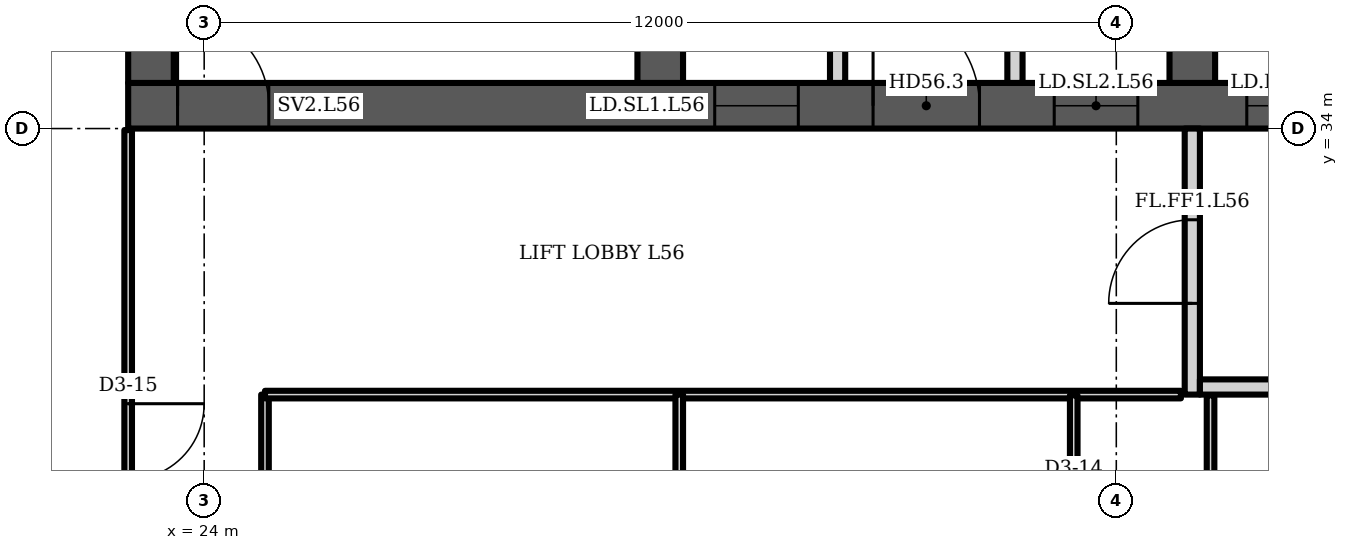
"""IFC4 building model, lengths in metres.
Left out: names, types, materials, properties, quantities, classifications, styles, units other than length and angle.
Written with IfcOpenShell. Run it as: python <this file> out.ifc"""

import sys

from ifc_helpers import new_model, si_unit, direction, frame, frame_2d, origin, place, context, subcontext, project, spatial, polyline, rectangle, outline, extrude, element, fill, save


model = new_model("IFC4")
c1 = context("Model", 3, precision=1e-05, world=origin(), true_north=direction((0.0, 1.0)))
c2 = subcontext(c1, "Body", "Model", "MODEL_VIEW")
j1 = project(units=[si_unit("LENGTHUNIT", "METRE"), si_unit("PLANEANGLEUNIT", "RADIAN")], contexts=[c1])
p1 = place(None, origin())
s1 = spatial("IfcSite", under=j1, at=p1, CompositionType="ELEMENT")
p2 = place(p1, origin())
s2 = spatial("IfcBuilding", under=s1, at=p2, CompositionType="ELEMENT")
p3 = place(p2, frame((0.0, 0.0, 225.1)))
s3 = spatial("IfcBuildingStorey", under=s2, at=p3, CompositionType="ELEMENT", Elevation=225.1)
p4 = place(p3, frame((23.0, 34.3, 0.0), z_axis=(0.0, 0.0, 1.0), x_axis=(1.0, 0.0, 0.0)))
e1 = element("IfcWall", 1, at=p4, inside=s3, PredefinedType="SHEAR", context=c2, shape_type="SweptSolid", body=[
    extrude(rectangle(XDim=35.0, YDim=0.6, at=frame_2d((17.5, 0.0))), origin(), (0.0, 0.0, 1.0), 3.6),
])
p5 = place(p4, frame((0.65, 0.0, 0.0)))
e2 = element("IfcOpeningElement", 2, at=p5, cuts=e1, PredefinedType="OPENING", context=c2, shape_type="SweptSolid", body=[
    extrude(rectangle(XDim=1.2, YDim=2.1, at=frame_2d((0.6, 1.05))), frame((0.0, 0.31, 0.0), z_axis=(0.0, -1.0, 0.0), x_axis=(1.0, 0.0, 0.0)), (0.0, 0.0, 1.0), 0.62),
])
p6 = place(p4, frame((7.717, 0.0, 0.0)))
e3 = element("IfcOpeningElement", 3, at=p6, cuts=e1, PredefinedType="OPENING", context=c2, shape_type="SweptSolid", body=[
    extrude(rectangle(XDim=1.1, YDim=2.1, at=frame_2d((0.55, 1.05))), frame((0.0, 0.31, 0.0), z_axis=(0.0, -1.0, 0.0), x_axis=(1.0, 0.0, 0.0)), (0.0, 0.0, 1.0), 0.62),
])
p7 = place(p4, frame((12.183, 0.0, 0.0)))
e4 = element("IfcOpeningElement", 4, at=p7, cuts=e1, PredefinedType="OPENING", context=c2, shape_type="SweptSolid", body=[
    extrude(rectangle(XDim=1.1, YDim=2.1, at=frame_2d((0.55, 1.05))), frame((0.0, 0.31, 0.0), z_axis=(0.0, -1.0, 0.0), x_axis=(1.0, 0.0, 0.0)), (0.0, 0.0, 1.0), 0.62),
])
p8 = place(p4, frame((9.8, 0.0, 0.0)))
e5 = element("IfcOpeningElement", 5, at=p8, cuts=e1, PredefinedType="OPENING", context=c2, shape_type="SweptSolid", body=[
    extrude(rectangle(XDim=1.4, YDim=2.1, at=frame_2d((0.7, 1.05))), frame((0.0, 0.31, 0.0), z_axis=(0.0, -1.0, 0.0), x_axis=(1.0, 0.0, 0.0)), (0.0, 0.0, 1.0), 0.62),
])
p9 = place(p4, frame((14.717, 0.0, 0.0)))
e6 = element("IfcOpeningElement", 6, at=p9, cuts=e1, PredefinedType="OPENING", context=c2, shape_type="SweptSolid", body=[
    extrude(rectangle(XDim=1.1, YDim=2.1, at=frame_2d((0.55, 1.05))), frame((0.0, 0.31, 0.0), z_axis=(0.0, -1.0, 0.0), x_axis=(1.0, 0.0, 0.0)), (0.0, 0.0, 1.0), 0.62),
])
p10 = place(p4, frame((16.95, 0.0, 0.0)))
e7 = element("IfcOpeningElement", 7, at=p10, cuts=e1, PredefinedType="OPENING", context=c2, shape_type="SweptSolid", body=[
    extrude(rectangle(XDim=1.1, YDim=2.1, at=frame_2d((0.55, 1.05))), frame((0.0, 0.31, 0.0), z_axis=(0.0, -1.0, 0.0), x_axis=(1.0, 0.0, 0.0)), (0.0, 0.0, 1.0), 0.62),
])
p11 = place(p4, frame((19.183, 0.0, 0.0)))
e8 = element("IfcOpeningElement", 8, at=p11, cuts=e1, PredefinedType="OPENING", context=c2, shape_type="SweptSolid", body=[
    extrude(rectangle(XDim=1.1, YDim=2.1, at=frame_2d((0.55, 1.05))), frame((0.0, 0.31, 0.0), z_axis=(0.0, -1.0, 0.0), x_axis=(1.0, 0.0, 0.0)), (0.0, 0.0, 1.0), 0.62),
])
p12 = place(p4, frame((26.15, 0.0, 0.0)))
e9 = element("IfcOpeningElement", 9, at=p12, cuts=e1, PredefinedType="OPENING", context=c2, shape_type="SweptSolid", body=[
    extrude(rectangle(XDim=1.2, YDim=2.1, at=frame_2d((0.6, 1.05))), frame((0.0, 0.31, 0.0), z_axis=(0.0, -1.0, 0.0), x_axis=(1.0, 0.0, 0.0)), (0.0, 0.0, 1.0), 0.62),
])
p13 = place(p4, frame((30.8, 0.0, 0.0)))
e10 = element("IfcOpeningElement", 10, at=p13, cuts=e1, PredefinedType="OPENING", context=c2, shape_type="SweptSolid", body=[
    extrude(rectangle(XDim=1.4, YDim=2.1, at=frame_2d((0.7, 1.05))), frame((0.0, 0.31, 0.0), z_axis=(0.0, -1.0, 0.0), x_axis=(1.0, 0.0, 0.0)), (0.0, 0.0, 1.0), 0.62),
])
p14 = place(p3, frame((23.3, 34.6, 0.0), z_axis=(0.0, 0.0, 1.0), x_axis=(0.0, 1.0, 0.0)))
e11 = element("IfcWall", 11, at=p14, inside=s3, PredefinedType="SHEAR", context=c2, shape_type="SweptSolid", body=[
    extrude(rectangle(XDim=13.585, YDim=0.6, at=frame_2d((6.792, 0.0))), origin(), (0.0, 0.0, 1.0), 3.6),
])
p15 = place(p3, frame((30.0, 34.6, 0.0), z_axis=(0.0, 0.0, 1.0), x_axis=(0.0, 1.0, 0.0)))
e12 = element("IfcWall", 12, at=p15, inside=s3, PredefinedType="SHEAR", context=c2, shape_type="SweptSolid", body=[
    extrude(rectangle(XDim=14.171, YDim=0.6, at=frame_2d((7.085, 0.0))), origin(), (0.0, 0.0, 1.0), 3.6),
])
p16 = place(p15, frame((3.8, 0.0, 0.0)))
e13 = element("IfcOpeningElement", 13, at=p16, cuts=e12, PredefinedType="OPENING", context=c2, shape_type="SweptSolid", body=[
    extrude(rectangle(XDim=1.1, YDim=2.1, at=frame_2d((0.55, 1.05))), frame((0.0, 0.31, 0.0), z_axis=(0.0, -1.0, 0.0), x_axis=(1.0, 0.0, 0.0)), (0.0, 0.0, 1.0), 0.62),
])
p17 = place(p3, frame((37.0, 34.6, 0.0), z_axis=(0.0, 0.0, 1.0), x_axis=(0.0, 1.0, 0.0)))
e14 = element("IfcWall", 14, at=p17, inside=s3, PredefinedType="SHEAR", context=c2, shape_type="SweptSolid", body=[
    extrude(rectangle(XDim=14.784, YDim=0.6, at=frame_2d((7.392, 0.0))), origin(), (0.0, 0.0, 1.0), 3.6),
])
p18 = place(p17, frame((11.302, 0.0, 0.0)))
e15 = element("IfcOpeningElement", 15, at=p18, cuts=e14, PredefinedType="OPENING", context=c2, shape_type="SweptSolid", body=[
    extrude(rectangle(XDim=1.0, YDim=2.1, at=frame_2d((0.5, 1.05))), frame((0.0, 0.31, 0.0), z_axis=(0.0, -1.0, 0.0), x_axis=(1.0, 0.0, 0.0)), (0.0, 0.0, 1.0), 0.62),
])
p19 = place(p17, frame((3.8, 0.0, 0.0)))
e16 = element("IfcOpeningElement", 16, at=p19, cuts=e14, PredefinedType="OPENING", context=c2, shape_type="SweptSolid", body=[
    extrude(rectangle(XDim=1.1, YDim=2.1, at=frame_2d((0.55, 1.05))), frame((0.0, 0.31, 0.0), z_axis=(0.0, -1.0, 0.0), x_axis=(1.0, 0.0, 0.0)), (0.0, 0.0, 1.0), 0.62),
])
p20 = place(p3, frame((0.0, 0.0, -0.0)))
e17 = element("IfcWall", 17, at=p20, inside=s3, PredefinedType="PARTITIONING", context=c2, shape_type="SweptSolid", body=[
    extrude(outline(polyline([(32.233, 37.45), (30.3, 37.45), (30.3, 37.65), (32.233, 37.65), (32.433, 37.65), (32.433, 34.6), (32.233, 34.6), (32.233, 37.45)])), origin(), (0.0, 0.0, 1.0), 3.2),
])
p21 = place(p3, frame((0.0, 0.0, -0.0)))
e18 = element("IfcWall", 18, at=p21, inside=s3, PredefinedType="PARTITIONING", context=c2, shape_type="SweptSolid", body=[
    extrude(outline(polyline([(34.567, 37.65), (34.767, 37.65), (36.7, 37.65), (36.7, 37.45), (34.767, 37.45), (34.767, 34.6), (34.567, 34.6), (34.567, 37.65)])), origin(), (0.0, 0.0, 1.0), 3.2),
])
p22 = place(p3, frame((0.0, 0.0, -0.0)))
e19 = element("IfcWall", 19, at=p22, inside=s3, PredefinedType="PARTITIONING", context=c2, shape_type="SweptSolid", body=[
    extrude(outline(polyline([(41.567, 37.1), (39.433, 37.1), (39.433, 34.6), (39.233, 34.6), (39.233, 37.45), (37.3, 37.45), (37.3, 37.65), (39.233, 37.65), (39.433, 37.65), (39.433, 37.3), (41.567, 37.3), (41.567, 37.35), (41.767, 37.35), (43.7, 37.35), (43.7, 37.15), (41.767, 37.15), (41.767, 34.6), (41.567, 34.6), (41.567, 37.1)])), origin(), (0.0, 0.0, 1.0), 3.2),
])
p23 = place(p3, frame((37.0, 30.5, 0.0), z_axis=(0.0, 0.0, 1.0), x_axis=(0.0, 1.0, 0.0)))
e20 = element("IfcWall", 20, at=p23, inside=s3, PredefinedType="PARTITIONING", context=c2, shape_type="SweptSolid", body=[
    extrude(rectangle(XDim=3.5, YDim=0.2, at=frame_2d((1.75, 0.0))), origin(), (0.0, 0.0, 1.0), 3.2),
])
p24 = place(p23, frame((1.2, 0.0, 0.0)))
e21 = element("IfcOpeningElement", 21, at=p24, cuts=e20, PredefinedType="OPENING", context=c2, shape_type="SweptSolid", body=[
    extrude(rectangle(XDim=1.1, YDim=2.1, at=frame_2d((0.55, 1.05))), frame((0.0, 0.11, 0.0), z_axis=(0.0, -1.0, 0.0), x_axis=(1.0, 0.0, 0.0)), (0.0, 0.0, 1.0), 0.22),
])
p25 = place(p3, frame((37.1, 30.6, 0.0), z_axis=(0.0, 0.0, 1.0), x_axis=(1.0, 0.0, 0.0)))
e22 = element("IfcWall", 22, at=p25, inside=s3, PredefinedType="PARTITIONING", context=c2, shape_type="SweptSolid", body=[
    extrude(rectangle(XDim=2.8, YDim=0.2, at=frame_2d((1.4, 0.0))), origin(), (0.0, 0.0, 1.0), 3.2),
])
p26 = place(p3, frame((23.0, 24.275, 0.0), z_axis=(0.0, 0.0, 1.0), x_axis=(0.0, 1.0, 0.0)))
e23 = element("IfcWall", 23, at=p26, inside=s3, PredefinedType="PARTITIONING", context=c2, shape_type="SweptSolid", body=[
    extrude(rectangle(XDim=9.705, YDim=0.1, at=frame_2d((4.853, 0.0))), origin(), (0.0, 0.0, 1.0), 3.2),
])
p27 = place(p26, frame((5.105, 0.0, 0.0)))
e24 = element("IfcOpeningElement", 24, at=p27, cuts=e23, PredefinedType="OPENING", context=c2, shape_type="SweptSolid", body=[
    extrude(rectangle(XDim=1.0, YDim=2.1, at=frame_2d((0.5, 1.05))), frame((0.0, 0.06, 0.0), z_axis=(0.0, -1.0, 0.0), x_axis=(1.0, 0.0, 0.0)), (0.0, 0.0, 1.0), 0.12),
])
p28 = place(p3, frame((24.8, 25.05, 0.0), z_axis=(0.0, 0.0, 1.0), x_axis=(0.0, 1.0, 0.0)))
e25 = element("IfcWall", 25, at=p28, inside=s3, PredefinedType="PARTITIONING", context=c2, shape_type="SweptSolid", body=[
    extrude(rectangle(XDim=5.45, YDim=0.1, at=frame_2d((2.725, 0.0))), origin(), (0.0, 0.0, 1.0), 3.2),
])
p29 = place(p28, frame((1.455, 0.0, 0.0)))
e26 = element("IfcOpeningElement", 26, at=p29, cuts=e25, PredefinedType="OPENING", context=c2, shape_type="SweptSolid", body=[
    extrude(rectangle(XDim=1.0, YDim=2.1, at=frame_2d((0.5, 1.05))), frame((0.0, 0.06, 0.0), z_axis=(0.0, -1.0, 0.0), x_axis=(1.0, 0.0, 0.0)), (0.0, 0.0, 1.0), 0.12),
])
p30 = place(p3, frame((24.8, 30.5, 0.0), z_axis=(0.0, 0.0, 1.0), x_axis=(1.0, 0.0, 0.0)))
e27 = element("IfcWall", 27, at=p30, inside=s3, PredefinedType="PARTITIONING", context=c2, shape_type="SweptSolid", body=[
    extrude(rectangle(XDim=12.05, YDim=0.1, at=frame_2d((6.025, 0.0))), origin(), (0.0, 0.0, 1.0), 3.2),
])
p31 = place(p3, frame((30.25, 17.0, 0.0), z_axis=(0.0, 0.0, 1.0), x_axis=(0.0, 1.0, 0.0)))
e28 = element("IfcWall", 28, at=p31, inside=s3, PredefinedType="PARTITIONING", context=c2, shape_type="SweptSolid", body=[
    extrude(rectangle(XDim=13.5, YDim=0.1, at=frame_2d((6.75, 0.0))), origin(), (0.0, 0.0, 1.0), 3.2),
])
p32 = place(p3, frame((35.44, 16.995, 0.0), z_axis=(0.0, 0.0, 1.0), x_axis=(0.0, 1.0, 0.0)))
e29 = element("IfcWall", 29, at=p32, inside=s3, PredefinedType="PARTITIONING", context=c2, shape_type="SweptSolid", body=[
    extrude(rectangle(XDim=13.495, YDim=0.1, at=frame_2d((6.748, 0.0))), origin(), (0.0, 0.0, 1.0), 3.2),
])
p33 = place(p32, frame((2.166, 0.0, 0.0)))
e30 = element("IfcOpeningElement", 30, at=p33, cuts=e29, PredefinedType="OPENING", context=c2, shape_type="SweptSolid", body=[
    extrude(rectangle(XDim=0.9, YDim=2.1, at=frame_2d((0.45, 1.05))), frame((0.0, 0.06, 0.0), z_axis=(0.0, -1.0, 0.0), x_axis=(1.0, 0.0, 0.0)), (0.0, 0.0, 1.0), 0.12),
])
p34 = place(p32, frame((7.215, 0.0, 0.0)))
e31 = element("IfcOpeningElement", 31, at=p34, cuts=e29, PredefinedType="OPENING", context=c2, shape_type="SweptSolid", body=[
    extrude(rectangle(XDim=0.9, YDim=2.1, at=frame_2d((0.45, 1.05))), frame((0.0, 0.06, 0.0), z_axis=(0.0, -1.0, 0.0), x_axis=(1.0, 0.0, 0.0)), (0.0, 0.0, 1.0), 0.12),
])
p35 = place(p32, frame((11.285, 0.0, 0.0)))
e32 = element("IfcOpeningElement", 32, at=p35, cuts=e29, PredefinedType="OPENING", context=c2, shape_type="SweptSolid", body=[
    extrude(rectangle(XDim=1.0, YDim=2.1, at=frame_2d((0.5, 1.05))), frame((0.0, 0.06, 0.0), z_axis=(0.0, -1.0, 0.0), x_axis=(1.0, 0.0, 0.0)), (0.0, 0.0, 1.0), 0.12),
])
p36 = place(p3, frame((37.24, 4.587, 0.0), z_axis=(0.0, 0.0, 1.0), x_axis=(0.0, 1.0, 0.0)))
e33 = element("IfcWall", 33, at=p36, inside=s3, PredefinedType="PARTITIONING", context=c2, shape_type="SweptSolid", body=[
    extrude(rectangle(XDim=25.903, YDim=0.1, at=frame_2d((12.952, 0.0))), origin(), (0.0, 0.0, 1.0), 2.58),
])
p37 = place(p36, frame((11.802, 0.0, 0.0)))
e34 = element("IfcOpeningElement", 34, at=p37, cuts=e33, PredefinedType="OPENING", context=c2, shape_type="SweptSolid", body=[
    extrude(rectangle(XDim=1.0, YDim=2.1, at=frame_2d((0.5, 1.05))), frame((0.0, 0.06, 0.0), z_axis=(0.0, -1.0, 0.0), x_axis=(1.0, 0.0, 0.0)), (0.0, 0.0, 1.0), 0.12),
])
p38 = place(p5, origin())
e35 = element("IfcDoor", 35, at=p38, inside=s3, OperationType="SINGLE_SWING_LEFT", PredefinedType="DOOR", context=c2, shape_type="SweptSolid", body=[
    extrude(rectangle(XDim=1.2, YDim=2.1, at=frame_2d((0.6, 1.05))), frame((0.0, 0.025, 0.0), z_axis=(0.0, -1.0, 0.0), x_axis=(1.0, 0.0, 0.0)), (0.0, 0.0, 1.0), 0.05),
])
fill(e2, e35)
p39 = place(p6, origin())
e36 = element("IfcDoor", 36, at=p39, inside=s3, OperationType="DOUBLE_DOOR_SLIDING", PredefinedType="DOOR", context=c2, shape_type="SweptSolid", body=[
    extrude(rectangle(XDim=1.1, YDim=2.1, at=frame_2d((0.55, 1.05))), frame((0.0, 0.025, 0.0), z_axis=(0.0, -1.0, 0.0), x_axis=(1.0, 0.0, 0.0)), (0.0, 0.0, 1.0), 0.05),
])
fill(e3, e36)
p40 = place(p7, origin())
e37 = element("IfcDoor", 37, at=p40, inside=s3, OperationType="DOUBLE_DOOR_SLIDING", PredefinedType="DOOR", context=c2, shape_type="SweptSolid", body=[
    extrude(rectangle(XDim=1.1, YDim=2.1, at=frame_2d((0.55, 1.05))), frame((0.0, 0.025, 0.0), z_axis=(0.0, -1.0, 0.0), x_axis=(1.0, 0.0, 0.0)), (0.0, 0.0, 1.0), 0.05),
])
fill(e4, e37)
p41 = place(p8, origin())
e38 = element("IfcDoor", 38, at=p41, inside=s3, OperationType="DOUBLE_DOOR_SINGLE_SWING", PredefinedType="DOOR", context=c2, shape_type="SweptSolid", body=[
    extrude(rectangle(XDim=1.4, YDim=2.1, at=frame_2d((0.7, 1.05))), frame((0.0, 0.025, 0.0), z_axis=(0.0, -1.0, 0.0), x_axis=(1.0, 0.0, 0.0)), (0.0, 0.0, 1.0), 0.05),
])
fill(e5, e38)
p42 = place(p9, origin())
e39 = element("IfcDoor", 39, at=p42, inside=s3, OperationType="DOUBLE_DOOR_SLIDING", PredefinedType="DOOR", context=c2, shape_type="SweptSolid", body=[
    extrude(rectangle(XDim=1.1, YDim=2.1, at=frame_2d((0.55, 1.05))), frame((0.0, 0.025, 0.0), z_axis=(0.0, -1.0, 0.0), x_axis=(1.0, 0.0, 0.0)), (0.0, 0.0, 1.0), 0.05),
])
fill(e6, e39)
p43 = place(p24, origin())
e40 = element("IfcDoor", 40, at=p43, inside=s3, OperationType="SINGLE_SWING_LEFT", PredefinedType="DOOR", context=c2, shape_type="SweptSolid", body=[
    extrude(rectangle(XDim=1.1, YDim=2.1, at=frame_2d((0.55, 1.05))), frame((0.0, 0.025, 0.0), z_axis=(0.0, -1.0, 0.0), x_axis=(1.0, 0.0, 0.0)), (0.0, 0.0, 1.0), 0.05),
])
fill(e21, e40)
p44 = place(p27, origin())
e41 = element("IfcDoor", 41, at=p44, inside=s3, OperationType="SINGLE_SWING_RIGHT", PredefinedType="DOOR", context=c2, shape_type="SweptSolid", body=[
    extrude(rectangle(XDim=1.0, YDim=2.1, at=frame_2d((0.5, 1.05))), frame((0.0, 0.025, 0.0), z_axis=(0.0, -1.0, 0.0), x_axis=(1.0, 0.0, 0.0)), (0.0, 0.0, 1.0), 0.05),
])
fill(e24, e41)
save(model, sys.argv[1])
